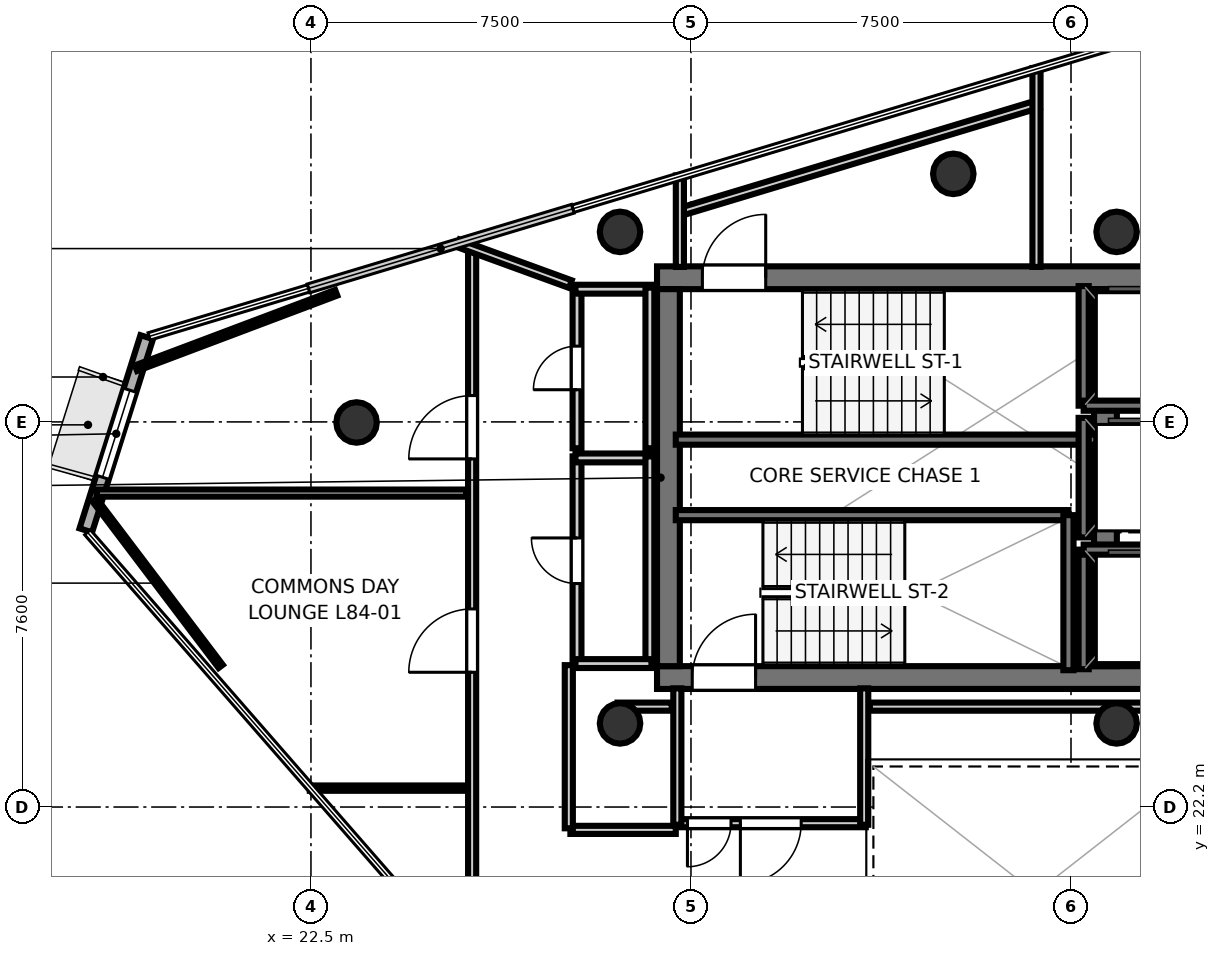
"""IFC4 building model, lengths in metres.
Left out: names, types, materials, properties, quantities, classifications, styles, units other than length and angle.
Written with IfcOpenShell. Run it as: python <this file> out.ifc"""

import sys

from ifc_helpers import new_model, si_unit, direction, frame, frame_2d, origin, origin_2d, place, context, subcontext, project, spatial, rectangle, hollow_circle, extrude, element, fill, save


model = new_model("IFC4")
c1 = context("Model", 3, precision=1e-05, world=origin(), true_north=direction((0.0, 1.0)))
c2 = subcontext(c1, "Body", "Model", "MODEL_VIEW")
j1 = project(units=[si_unit("LENGTHUNIT", "METRE"), si_unit("PLANEANGLEUNIT", "RADIAN")], contexts=[c1])
p1 = place(None, origin())
s1 = spatial("IfcSite", under=j1, at=p1, CompositionType="ELEMENT")
p2 = place(p1, origin())
s2 = spatial("IfcBuilding", under=s1, at=p2, CompositionType="ELEMENT")
p3 = place(p2, frame((0.0, 0.0, 325.9)))
s3 = spatial("IfcBuildingStorey", under=s2, at=p3, CompositionType="ELEMENT", Elevation=325.9)
p4 = place(p3, frame((29.33, 32.645, 0.0), z_axis=(0.0, 0.0, 1.0), x_axis=(1.0, 0.0, 0.0)))
e1 = element("IfcWall", 1, at=p4, inside=s3, PredefinedType="SHEAR", context=c2, shape_type="SweptSolid", body=[
    extrude(rectangle(XDim=10.52, YDim=0.45, at=frame_2d((5.26, 0.0))), origin(), (0.0, 0.0, 1.0), 3.52),
])
p5 = place(p4, frame((0.895, 0.0, 0.0)))
e2 = element("IfcOpeningElement", 2, at=p5, cuts=e1, PredefinedType="OPENING", context=c2, shape_type="SweptSolid", body=[
    extrude(rectangle(XDim=1.25, YDim=2.15, at=frame_2d((0.625, 1.075))), frame((0.0, 0.235, 0.0), z_axis=(0.0, -1.0, 0.0), x_axis=(1.0, 0.0, 0.0)), (0.0, 0.0, 1.0), 0.47),
])
p6 = place(p3, frame((29.33, 24.755, 0.0), z_axis=(0.0, 0.0, 1.0), x_axis=(1.0, 0.0, 0.0)))
e3 = element("IfcWall", 3, at=p6, inside=s3, PredefinedType="SHEAR", context=c2, shape_type="SweptSolid", body=[
    extrude(rectangle(XDim=10.52, YDim=0.45, at=frame_2d((5.26, 0.0))), origin(), (0.0, 0.0, 1.0), 3.52),
])
p7 = place(p6, frame((0.695, 0.0, 0.0)))
e4 = element("IfcOpeningElement", 4, at=p7, cuts=e3, PredefinedType="OPENING", context=c2, shape_type="SweptSolid", body=[
    extrude(rectangle(XDim=1.25, YDim=2.15, at=frame_2d((0.625, 1.075))), frame((0.0, 0.235, 0.0), z_axis=(0.0, -1.0, 0.0), x_axis=(1.0, 0.0, 0.0)), (0.0, 0.0, 1.0), 0.47),
])
for number, where, z_axis, x_axis in (
    (5, (29.555, 24.98, 0.0), (0.0, 0.0, 1.0), (0.0, 1.0, 0.0)),
    (6, (38.18, 24.98, 0.0), (0.0, 0.0, 1.0), (0.0, 1.0, 0.0)),
):
    element("IfcWall", number, at=place(p3, frame(where, z_axis=z_axis, x_axis=x_axis)), inside=s3, PredefinedType="SHEAR", context=c2, shape_type="SweptSolid", body=[
        extrude(rectangle(XDim=7.44, YDim=0.45, at=frame_2d((3.72, 0.0))), origin(), (0.0, 0.0, 1.0), 3.52),
    ])
for number, where, z_axis, x_axis in (
    (7, (28.6, 33.55, 0.0), (0.0, 0.0, 1.0), (1.0, 0.0, 0.0)),
    (8, (28.6, 23.85, 0.0), (0.0, 0.0, 1.0), (1.0, 0.0, 0.0)),
    (9, (38.4, 33.55, 0.0), (0.0, 0.0, 1.0), (1.0, 0.0, 0.0)),
    (10, (38.4, 23.85, 0.0), (0.0, 0.0, 1.0), (1.0, 0.0, 0.0)),
):
    element("IfcColumn", number, at=place(p3, frame(where, z_axis=z_axis, x_axis=x_axis)), inside=s3, PredefinedType="COLUMN", context=c2, shape_type="SweptSolid", body=[
        extrude(hollow_circle(Radius=0.4, WallThickness=0.022, at=origin_2d()), origin(), (0.0, 0.0, 1.0), 3.7),
    ])
for number, where, z_axis, x_axis in (
    (11, (35.177, 34.695, -0.23), (0.0, 0.0, 1.0), (1.0, 0.0, 0.0)),
    (12, (23.4, 29.789, -0.23), (0.0, 0.0, 1.0), (1.0, 0.0, 0.0)),
):
    element("IfcColumn", number, at=place(p3, frame(where, z_axis=z_axis, x_axis=x_axis)), inside=s3, PredefinedType="COLUMN", context=c2, shape_type="SweptSolid", body=[
        extrude(hollow_circle(Radius=0.4, WallThickness=0.022, at=origin_2d()), origin(), (0.0, 0.0, 1.0), 3.93),
    ])
p8 = place(p3, frame((19.259, 31.473, 0.0), z_axis=(0.0, 0.0, 1.0), x_axis=(-0.300558508895, -0.953763378795, 0.0)))
e13 = element("IfcWall", 13, at=p8, inside=s3, PredefinedType="SOLIDWALL", context=c2, shape_type="SweptSolid", body=[
    extrude(rectangle(XDim=3.998, YDim=0.26, at=frame_2d((1.999, 0.0))), origin(), (0.0, 0.0, 1.0), 3.52),
])
p9 = place(p8, frame((1.099, 0.0, 0.85)))
e14 = element("IfcOpeningElement", 14, at=p9, cuts=e13, PredefinedType="OPENING", context=c2, shape_type="SweptSolid", body=[
    extrude(rectangle(XDim=1.8, YDim=2.1, at=frame_2d((0.9, 1.05))), frame((0.0, 0.14, 0.0), z_axis=(0.0, -1.0, 0.0), x_axis=(1.0, 0.0, 0.0)), (0.0, 0.0, 1.0), 0.28),
])
p10 = place(p3, frame((29.7, 29.45, 0.0), z_axis=(0.0, 0.0, 1.0), x_axis=(1.0, 0.0, 0.0)))
e15 = element("IfcWall", 15, at=p10, inside=s3, PredefinedType="SOLIDWALL", context=c2, shape_type="SweptSolid", body=[
    extrude(rectangle(XDim=8.3, YDim=0.2, at=frame_2d((4.15, 0.0))), origin(), (0.0, 0.0, 1.0), 3.52),
])
p11 = place(p3, frame((29.7, 27.96, 0.0), z_axis=(0.0, 0.0, 1.0), x_axis=(1.0, 0.0, 0.0)))
e16 = element("IfcWall", 16, at=p11, inside=s3, PredefinedType="SOLIDWALL", context=c2, shape_type="SweptSolid", body=[
    extrude(rectangle(XDim=7.75, YDim=0.2, at=frame_2d((3.875, 0.0))), origin(), (0.0, 0.0, 1.0), 3.52),
])
p12 = place(p3, frame((37.45, 24.9, 0.0), z_axis=(0.0, 0.0, 1.0), x_axis=(0.0, 1.0, 0.0)))
e17 = element("IfcWall", 17, at=p12, inside=s3, PredefinedType="SOLIDWALL", context=c2, shape_type="SweptSolid", body=[
    extrude(rectangle(XDim=3.06, YDim=0.2, at=frame_2d((1.53, 0.0))), origin(), (0.0, 0.0, 1.0), 3.52),
])
p13 = place(p3, frame((37.75, 30.12, 0.0), z_axis=(0.0, 0.0, 1.0), x_axis=(0.0, 1.0, 0.0)))
e18 = element("IfcWall", 18, at=p13, inside=s3, PredefinedType="SOLIDWALL", context=c2, shape_type="SweptSolid", body=[
    extrude(rectangle(XDim=2.36, YDim=0.2, at=frame_2d((1.18, 0.0))), origin(), (0.0, 0.0, 1.0), 3.52),
])
p14 = place(p3, frame((37.75, 30.12, 0.0), z_axis=(0.0, 0.0, 1.0), x_axis=(1.0, 0.0, 0.0)))
e19 = element("IfcWall", 19, at=p14, inside=s3, PredefinedType="SOLIDWALL", context=c2, shape_type="SweptSolid", body=[
    extrude(rectangle(XDim=2.1, YDim=0.2, at=frame_2d((1.05, 0.0))), origin(), (0.0, 0.0, 1.0), 3.52),
])
p15 = place(p3, frame((37.75, 24.92, 0.0), z_axis=(0.0, 0.0, 1.0), x_axis=(0.0, 1.0, 0.0)))
e20 = element("IfcWall", 20, at=p15, inside=s3, PredefinedType="SOLIDWALL", context=c2, shape_type="SweptSolid", body=[
    extrude(rectangle(XDim=2.36, YDim=0.2, at=frame_2d((1.18, 0.0))), origin(), (0.0, 0.0, 1.0), 3.52),
])
p16 = place(p3, frame((37.75, 27.28, 0.0), z_axis=(0.0, 0.0, 1.0), x_axis=(1.0, 0.0, 0.0)))
e21 = element("IfcWall", 21, at=p16, inside=s3, PredefinedType="SOLIDWALL", context=c2, shape_type="SweptSolid", body=[
    extrude(rectangle(XDim=2.1, YDim=0.2, at=frame_2d((1.05, 0.0))), origin(), (0.0, 0.0, 1.0), 3.52),
])
p17 = place(p3, frame((37.75, 27.52, 0.0), z_axis=(0.0, 0.0, 1.0), x_axis=(0.0, 1.0, 0.0)))
e22 = element("IfcWall", 22, at=p17, inside=s3, PredefinedType="SOLIDWALL", context=c2, shape_type="SweptSolid", body=[
    extrude(rectangle(XDim=2.36, YDim=0.2, at=frame_2d((1.18, 0.0))), origin(), (0.0, 0.0, 1.0), 3.52),
])
p18 = place(p3, frame((29.759, 33.935, 0.0), z_axis=(0.0, 0.0, 1.0), x_axis=(0.957477622137, 0.288507544281, 0.0)))
e23 = element("IfcWall", 23, at=p18, inside=s3, PredefinedType="PARTITIONING", context=c2, shape_type="SweptSolid", body=[
    extrude(rectangle(XDim=7.416, YDim=0.16, at=frame_2d((3.708, 0.0))), origin(), (0.0, 0.0, 1.0), 2.84),
])
p19 = place(p3, frame((36.819, 36.783, 0.0), z_axis=(0.0, 0.0, 1.0), x_axis=(0.0, -1.0, 0.0)))
e24 = element("IfcWall", 24, at=p19, inside=s3, PredefinedType="PARTITIONING", context=c2, shape_type="SweptSolid", body=[
    extrude(rectangle(XDim=3.925, YDim=0.16, at=frame_2d((1.963, 0.0))), origin(), (0.0, 0.0, 1.0), 2.84),
])
p20 = place(p3, frame((29.781, 32.858, 0.0), z_axis=(0.0, 0.0, 1.0), x_axis=(0.0, 1.0, 0.0)))
e25 = element("IfcWall", 25, at=p20, inside=s3, PredefinedType="PARTITIONING", context=c2, shape_type="SweptSolid", body=[
    extrude(rectangle(XDim=1.805, YDim=0.16, at=frame_2d((0.902, 0.0))), origin(), (0.0, 0.0, 1.0), 2.84),
])
p21 = place(p3, frame((33.45, 21.881, 0.0), z_axis=(0.0, 0.0, 1.0), x_axis=(-1.0, 0.0, 0.0)))
e26 = element("IfcWall", 26, at=p21, inside=s3, PredefinedType="PARTITIONING", context=c2, shape_type="SweptSolid", body=[
    extrude(rectangle(XDim=3.75, YDim=0.16, at=frame_2d((1.875, 0.0))), origin(), (0.0, 0.0, 1.0), 2.84),
])
p22 = place(p21, frame((1.275, 0.0, 0.0)))
e27 = element("IfcOpeningElement", 27, at=p22, cuts=e26, PredefinedType="OPENING", context=c2, shape_type="SweptSolid", body=[
    extrude(rectangle(XDim=1.2, YDim=2.15, at=frame_2d((0.6, 1.075))), frame((0.0, 0.09, 0.0), z_axis=(0.0, -1.0, 0.0), x_axis=(1.0, 0.0, 0.0)), (0.0, 0.0, 1.0), 0.18),
])
p23 = place(p21, frame((2.66, 0.0, 0.0)))
e28 = element("IfcOpeningElement", 28, at=p23, cuts=e26, PredefinedType="OPENING", context=c2, shape_type="SweptSolid", body=[
    extrude(rectangle(XDim=0.86, YDim=2.05, at=frame_2d((0.43, 1.025))), frame((0.0, 0.09, 0.0), z_axis=(0.0, -1.0, 0.0), x_axis=(1.0, 0.0, 0.0)), (0.0, 0.0, 1.0), 0.18),
])
for number, where, z_axis, x_axis in (
    (29, (29.731, 21.85, 0.0), (0.0, 0.0, 1.0), (0.0, 1.0, 0.0)),
    (30, (33.419, 24.542, 0.0), (0.0, 0.0, 1.0), (0.0, -1.0, 0.0)),
):
    element("IfcWall", number, at=place(p3, frame(where, z_axis=z_axis, x_axis=x_axis)), inside=s3, PredefinedType="PARTITIONING", context=c2, shape_type="SweptSolid", body=[
        extrude(rectangle(XDim=2.692, YDim=0.16, at=frame_2d((1.346, 0.0))), origin(), (0.0, 0.0, 1.0), 2.84),
    ])
p24 = place(p3, frame((27.751, 25.0, 0.0), z_axis=(0.0, 0.0, 1.0), x_axis=(0.0, 1.0, 0.0)))
e31 = element("IfcWall", 31, at=p24, inside=s3, PredefinedType="PLUMBINGWALL", context=c2, shape_type="SweptSolid", body=[
    extrude(rectangle(XDim=4.12, YDim=0.175, at=frame_2d((2.06, 0.0))), origin(), (0.0, 0.0, 1.0), 2.84),
])
p25 = place(p24, frame((1.61, 0.0, 0.0)))
e32 = element("IfcOpeningElement", 32, at=p25, cuts=e31, PredefinedType="OPENING", context=c2, shape_type="SweptSolid", body=[
    extrude(rectangle(XDim=0.9, YDim=2.1, at=frame_2d((0.45, 1.05))), frame((0.0, 0.097, 0.0), z_axis=(0.0, -1.0, 0.0), x_axis=(1.0, 0.0, 0.0)), (0.0, 0.0, 1.0), 0.195),
])
p26 = place(p3, frame((27.72, 29.089, 0.0), z_axis=(0.0, 0.0, 1.0), x_axis=(1.0, 0.0, 0.0)))
e33 = element("IfcWall", 33, at=p26, inside=s3, PredefinedType="PLUMBINGWALL", context=c2, shape_type="SweptSolid", body=[
    extrude(rectangle(XDim=1.5, YDim=0.175, at=frame_2d((0.75, 0.0))), origin(), (0.0, 0.0, 1.0), 2.84),
])
p27 = place(p3, frame((29.189, 29.12, 0.0), z_axis=(0.0, 0.0, 1.0), x_axis=(0.0, -1.0, 0.0)))
e34 = element("IfcWall", 34, at=p27, inside=s3, PredefinedType="PLUMBINGWALL", context=c2, shape_type="SweptSolid", body=[
    extrude(rectangle(XDim=4.12, YDim=0.175, at=frame_2d((2.06, 0.0))), origin(), (0.0, 0.0, 1.0), 2.84),
])
p28 = place(p3, frame((29.22, 25.031, 0.0), z_axis=(0.0, 0.0, 1.0), x_axis=(-1.0, 0.0, 0.0)))
e35 = element("IfcWall", 35, at=p28, inside=s3, PredefinedType="PLUMBINGWALL", context=c2, shape_type="SweptSolid", body=[
    extrude(rectangle(XDim=1.5, YDim=0.175, at=frame_2d((0.75, 0.0))), origin(), (0.0, 0.0, 1.0), 2.84),
])
p29 = place(p3, frame((27.751, 29.28, 0.0), z_axis=(0.0, 0.0, 1.0), x_axis=(0.0, 1.0, 0.0)))
e36 = element("IfcWall", 36, at=p29, inside=s3, PredefinedType="PLUMBINGWALL", context=c2, shape_type="SweptSolid", body=[
    extrude(rectangle(XDim=3.17, YDim=0.175, at=frame_2d((1.585, 0.0))), origin(), (0.0, 0.0, 1.0), 2.84),
])
p30 = place(p29, frame((1.155, 0.0, 0.0)))
e37 = element("IfcOpeningElement", 37, at=p30, cuts=e36, PredefinedType="OPENING", context=c2, shape_type="SweptSolid", body=[
    extrude(rectangle(XDim=0.86, YDim=2.05, at=frame_2d((0.43, 1.025))), frame((0.0, 0.097, 0.0), z_axis=(0.0, -1.0, 0.0), x_axis=(1.0, 0.0, 0.0)), (0.0, 0.0, 1.0), 0.195),
])
p31 = place(p3, frame((27.72, 32.419, 0.0), z_axis=(0.0, 0.0, 1.0), x_axis=(1.0, 0.0, 0.0)))
e38 = element("IfcWall", 38, at=p31, inside=s3, PredefinedType="PLUMBINGWALL", context=c2, shape_type="SweptSolid", body=[
    extrude(rectangle(XDim=1.5, YDim=0.175, at=frame_2d((0.75, 0.0))), origin(), (0.0, 0.0, 1.0), 2.84),
])
p32 = place(p3, frame((29.189, 32.45, 0.0), z_axis=(0.0, 0.0, 1.0), x_axis=(0.0, -1.0, 0.0)))
e39 = element("IfcWall", 39, at=p32, inside=s3, PredefinedType="PLUMBINGWALL", context=c2, shape_type="SweptSolid", body=[
    extrude(rectangle(XDim=3.17, YDim=0.175, at=frame_2d((1.585, 0.0))), origin(), (0.0, 0.0, 1.0), 2.84),
])
p33 = place(p3, frame((29.62, 24.181, 0.0), z_axis=(0.0, 0.0, 1.0), x_axis=(-1.0, 0.0, 0.0)))
e40 = element("IfcWall", 40, at=p33, inside=s3, PredefinedType="PARTITIONING", context=c2, shape_type="SweptSolid", body=[
    extrude(rectangle(XDim=1.07, YDim=0.16, at=frame_2d((0.535, 0.0))), origin(), (0.0, 0.0, 1.0), 2.84),
])
p34 = place(p3, frame((39.75, 24.181, 0.0), z_axis=(0.0, 0.0, 1.0), x_axis=(-1.0, 0.0, 0.0)))
e41 = element("IfcWall", 41, at=p34, inside=s3, PredefinedType="PARTITIONING", context=c2, shape_type="SweptSolid", body=[
    extrude(rectangle(XDim=6.22, YDim=0.16, at=frame_2d((3.11, 0.0))), origin(), (0.0, 0.0, 1.0), 2.84),
])
p35 = place(p3, frame((27.62, 21.749, 0.0), z_axis=(0.0, 0.0, 1.0), x_axis=(1.0, 0.0, 0.0)))
e42 = element("IfcWall", 42, at=p35, inside=s3, PredefinedType="PARTITIONING", context=c2, shape_type="SweptSolid", body=[
    extrude(rectangle(XDim=2.08, YDim=0.16, at=frame_2d((1.04, 0.0))), origin(), (0.0, 0.0, 1.0), 2.84),
])
p36 = place(p3, frame((25.681, 18.906, 0.0), z_axis=(0.0, 0.0, 1.0), x_axis=(0.0, 1.0, 0.0)))
e43 = element("IfcWall", 43, at=p36, inside=s3, PredefinedType="PARTITIONING", context=c2, shape_type="SweptSolid", body=[
    extrude(rectangle(XDim=14.521, YDim=0.16, at=frame_2d((7.261, 0.0))), origin(), (0.0, 0.0, 1.0), 2.84),
])
p37 = place(p36, frame((5.953, 0.0, 0.0)))
e44 = element("IfcOpeningElement", 44, at=p37, cuts=e43, PredefinedType="OPENING", context=c2, shape_type="SweptSolid", body=[
    extrude(rectangle(XDim=1.25, YDim=2.2, at=frame_2d((0.625, 1.1))), frame((0.0, 0.09, 0.0), z_axis=(0.0, -1.0, 0.0), x_axis=(1.0, 0.0, 0.0)), (0.0, 0.0, 1.0), 0.18),
])
p38 = place(p36, frame((10.164, 0.0, 0.0)))
e45 = element("IfcOpeningElement", 45, at=p38, cuts=e43, PredefinedType="OPENING", context=c2, shape_type="SweptSolid", body=[
    extrude(rectangle(XDim=1.25, YDim=2.2, at=frame_2d((0.625, 1.1))), frame((0.0, 0.09, 0.0), z_axis=(0.0, -1.0, 0.0), x_axis=(1.0, 0.0, 0.0)), (0.0, 0.0, 1.0), 0.18),
])
p39 = place(p3, frame((25.407, 33.325, 0.0), z_axis=(0.0, 0.0, 1.0), x_axis=(0.939605648966, -0.342259001973, 0.0)))
e46 = element("IfcWall", 46, at=p39, inside=s3, PredefinedType="PARTITIONING", context=c2, shape_type="SweptSolid", body=[
    extrude(rectangle(XDim=2.355, YDim=0.16, at=frame_2d((1.178, 0.0))), origin(), (0.0, 0.0, 1.0), 2.84),
])
p40 = place(p3, frame((27.589, 25.0, 0.0), z_axis=(0.0, 0.0, 1.0), x_axis=(0.0, -1.0, 0.0)))
e47 = element("IfcWall", 47, at=p40, inside=s3, PredefinedType="PARTITIONING", context=c2, shape_type="SweptSolid", body=[
    extrude(rectangle(XDim=3.22, YDim=0.16, at=frame_2d((1.61, 0.0))), origin(), (0.0, 0.0, 1.0), 2.84),
])
p41 = place(p3, frame((20.719, 24.975, 0.0), z_axis=(0.0, 0.0, 1.0), x_axis=(-0.603791576921, 0.797142227987, 0.0)))
e48 = element("IfcWall", 48, at=p41, inside=s3, PredefinedType="PARTITIONING", context=c2, shape_type="SweptSolid", body=[
    extrude(rectangle(XDim=4.124, YDim=0.105, at=frame_2d((2.062, 0.0))), origin(), (0.0, 0.0, 1.0), 2.84),
])
p42 = place(p3, frame((18.269, 28.395, 0.0), z_axis=(0.0, 0.0, 1.0), x_axis=(1.0, 0.0, 0.0)))
e49 = element("IfcWall", 49, at=p42, inside=s3, PredefinedType="PARTITIONING", context=c2, shape_type="SweptSolid", body=[
    extrude(rectangle(XDim=7.301, YDim=0.14, at=frame_2d((3.651, 0.0))), origin(), (0.0, 0.0, 1.0), 2.84),
])
p43 = place(p3, frame((25.57, 22.573, 0.0), z_axis=(0.0, 0.0, 1.0), x_axis=(-1.0, 0.0, 0.0)))
e50 = element("IfcWall", 50, at=p43, inside=s3, PredefinedType="PARTITIONING", context=c2, shape_type="SweptSolid", body=[
    extrude(rectangle(XDim=3.093, YDim=0.105, at=frame_2d((1.546, 0.0))), origin(), (0.0, 0.0, 1.0), 2.84),
])
p44 = place(p3, frame((19.048, 30.86, 0.0), z_axis=(0.0, 0.0, 1.0), x_axis=(0.935745774654, 0.352675268791, 0.0)))
e51 = element("IfcWall", 51, at=p44, inside=s3, PredefinedType="PARTITIONING", context=c2, shape_type="SweptSolid", body=[
    extrude(rectangle(XDim=4.223, YDim=0.12, at=frame_2d((2.111, 0.0))), origin(), (0.0, 0.0, 1.0), 2.84),
])
p45 = place(p5, origin())
e52 = element("IfcDoor", 52, at=p45, inside=s3, OperationType="SINGLE_SWING_RIGHT", PredefinedType="DOOR", context=c2, shape_type="SweptSolid", body=[
    extrude(rectangle(XDim=1.25, YDim=2.15, at=frame_2d((0.625, 1.075))), frame((0.0, 0.025, 0.0), z_axis=(0.0, -1.0, 0.0), x_axis=(1.0, 0.0, 0.0)), (0.0, 0.0, 1.0), 0.05),
])
fill(e2, e52)
p46 = place(p7, origin())
e53 = element("IfcDoor", 53, at=p46, inside=s3, OperationType="SINGLE_SWING_RIGHT", PredefinedType="DOOR", context=c2, shape_type="SweptSolid", body=[
    extrude(rectangle(XDim=1.25, YDim=2.15, at=frame_2d((0.625, 1.075))), frame((0.0, 0.025, 0.0), z_axis=(0.0, -1.0, 0.0), x_axis=(1.0, 0.0, 0.0)), (0.0, 0.0, 1.0), 0.05),
])
fill(e4, e53)
p47 = place(p22, origin())
e54 = element("IfcDoor", 54, at=p47, inside=s3, OperationType="SINGLE_SWING_RIGHT", PredefinedType="DOOR", context=c2, shape_type="SweptSolid", body=[
    extrude(rectangle(XDim=1.2, YDim=2.15, at=frame_2d((0.6, 1.075))), frame((0.0, 0.025, 0.0), z_axis=(0.0, -1.0, 0.0), x_axis=(1.0, 0.0, 0.0)), (0.0, 0.0, 1.0), 0.05),
])
fill(e27, e54)
p48 = place(p25, origin())
e55 = element("IfcDoor", 55, at=p48, inside=s3, OperationType="SINGLE_SWING_RIGHT", PredefinedType="DOOR", context=c2, shape_type="SweptSolid", body=[
    extrude(rectangle(XDim=0.9, YDim=2.1, at=frame_2d((0.45, 1.05))), frame((0.0, 0.025, 0.0), z_axis=(0.0, -1.0, 0.0), x_axis=(1.0, 0.0, 0.0)), (0.0, 0.0, 1.0), 0.05),
])
fill(e32, e55)
p49 = place(p30, origin())
e56 = element("IfcDoor", 56, at=p49, inside=s3, OperationType="SINGLE_SWING_LEFT", PredefinedType="DOOR", context=c2, shape_type="SweptSolid", body=[
    extrude(rectangle(XDim=0.86, YDim=2.05, at=frame_2d((0.43, 1.025))), frame((0.0, 0.025, 0.0), z_axis=(0.0, -1.0, 0.0), x_axis=(1.0, 0.0, 0.0)), (0.0, 0.0, 1.0), 0.05),
])
fill(e37, e56)
p50 = place(p23, origin())
e57 = element("IfcDoor", 57, at=p50, inside=s3, OperationType="SINGLE_SWING_RIGHT", PredefinedType="DOOR", context=c2, shape_type="SweptSolid", body=[
    extrude(rectangle(XDim=0.86, YDim=2.05, at=frame_2d((0.43, 1.025))), frame((0.0, 0.025, 0.0), z_axis=(0.0, -1.0, 0.0), x_axis=(1.0, 0.0, 0.0)), (0.0, 0.0, 1.0), 0.05),
])
fill(e28, e57)
p51 = place(p37, origin())
e58 = element("IfcDoor", 58, at=p51, inside=s3, OperationType="SINGLE_SWING_LEFT", PredefinedType="DOOR", context=c2, shape_type="SweptSolid", body=[
    extrude(rectangle(XDim=1.25, YDim=2.2, at=frame_2d((0.625, 1.1))), frame((0.0, 0.025, 0.0), z_axis=(0.0, -1.0, 0.0), x_axis=(1.0, 0.0, 0.0)), (0.0, 0.0, 1.0), 0.05),
])
fill(e44, e58)
p52 = place(p38, origin())
e59 = element("IfcDoor", 59, at=p52, inside=s3, OperationType="SINGLE_SWING_LEFT", PredefinedType="DOOR", context=c2, shape_type="SweptSolid", body=[
    extrude(rectangle(XDim=1.25, YDim=2.2, at=frame_2d((0.625, 1.1))), frame((0.0, 0.025, 0.0), z_axis=(0.0, -1.0, 0.0), x_axis=(1.0, 0.0, 0.0)), (0.0, 0.0, 1.0), 0.05),
])
fill(e45, e59)
p53 = place(p9, origin())
e60 = element("IfcWindow", 60, at=p53, inside=s3, PartitioningType="SINGLE_PANEL", PredefinedType="WINDOW", context=c2, shape_type="SweptSolid", body=[
    extrude(rectangle(XDim=1.8, YDim=2.1, at=frame_2d((0.9, 1.05))), frame((0.0, 0.03, 0.0), z_axis=(0.0, -1.0, 0.0), x_axis=(1.0, 0.0, 0.0)), (0.0, 0.0, 1.0), 0.06),
])
fill(e14, e60)
save(model, sys.argv[1])
